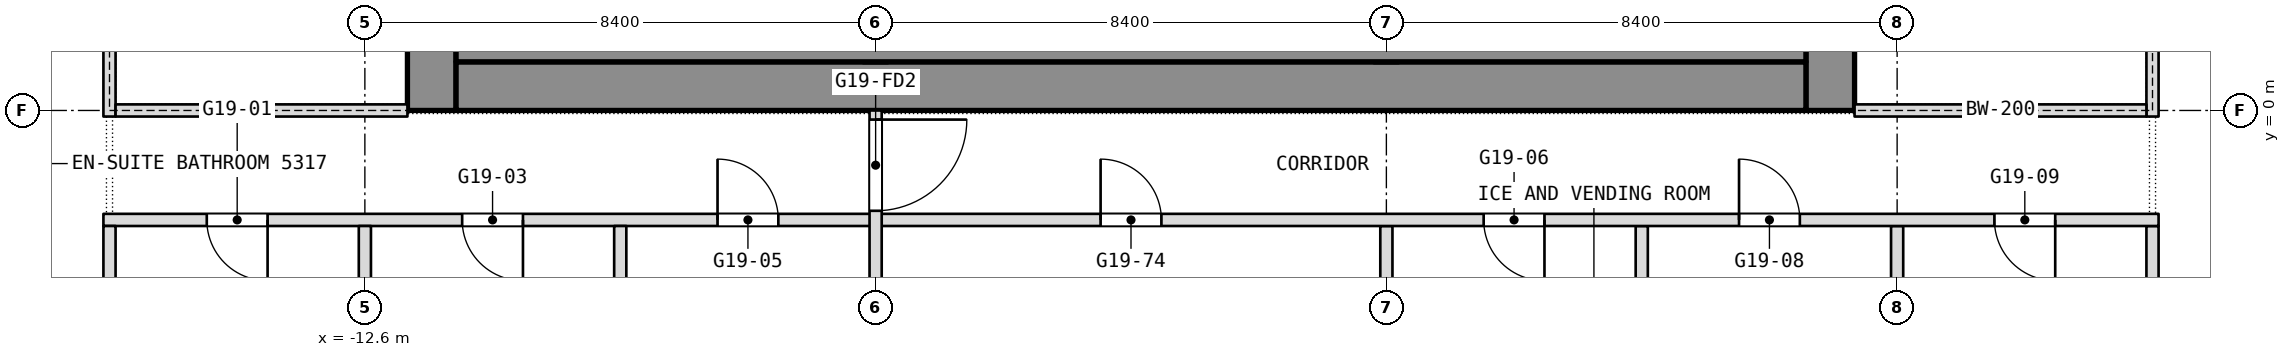
"""IFC4 building model, lengths in metres.
Left out: names, types, materials, properties, quantities, classifications, styles, units other than length and angle.
Written with IfcOpenShell. Run it as: python <this file> out.ifc"""

import sys

from ifc_helpers import new_model, si_unit, direction, frame, frame_2d, origin, place, context, subcontext, project, spatial, rectangle, extrude, element, fill, save


model = new_model("IFC4")
c1 = context("Model", 3, precision=1e-05, world=origin(), true_north=direction((0.0, 1.0)))
c2 = subcontext(c1, "Body", "Model", "MODEL_VIEW")
j1 = project(units=[si_unit("LENGTHUNIT", "METRE"), si_unit("PLANEANGLEUNIT", "RADIAN")], contexts=[c1])
p1 = place(None, origin())
s1 = spatial("IfcSite", under=j1, at=p1, CompositionType="ELEMENT")
p2 = place(p1, origin())
s2 = spatial("IfcBuilding", under=s1, at=p2, CompositionType="ELEMENT")
p3 = place(p2, frame((0.0, 0.0, 227.3)))
s3 = spatial("IfcBuildingStorey", under=s2, at=p3, CompositionType="ELEMENT", Elevation=227.3)
p4 = place(p3, frame((11.5, 0.0, 0.0), z_axis=(0.0, 0.0, 1.0), x_axis=(0.0, 1.0, 0.0)))
e1 = element("IfcWall", 1, at=p4, inside=s3, PredefinedType="SHEAR", context=c2, shape_type="SweptSolid", body=[
    extrude(rectangle(XDim=16.8, YDim=0.8, at=frame_2d((8.4, 0.0))), origin(), (0.0, 0.0, 1.0), 3.6),
])
p5 = place(p4, frame((2.3, 0.0, 0.0)))
e2 = element("IfcOpeningElement", 2, at=p5, cuts=e1, PredefinedType="OPENING", context=c2, shape_type="SweptSolid", body=[
    extrude(rectangle(XDim=1.1, YDim=2.1, at=frame_2d((0.55, 1.05))), frame((0.0, 0.4, 0.0), z_axis=(0.0, -1.0, 0.0), x_axis=(1.0, 0.0, 0.0)), (0.0, 0.0, 1.0), 0.8),
])
p6 = place(p4, frame((4.85, 0.0, 0.0)))
e3 = element("IfcOpeningElement", 3, at=p6, cuts=e1, PredefinedType="OPENING", context=c2, shape_type="SweptSolid", body=[
    extrude(rectangle(XDim=1.1, YDim=2.1, at=frame_2d((0.55, 1.05))), frame((0.0, 0.4, 0.0), z_axis=(0.0, -1.0, 0.0), x_axis=(1.0, 0.0, 0.0)), (0.0, 0.0, 1.0), 0.8),
])
p7 = place(p4, frame((6.825, 0.0, 0.0)))
e4 = element("IfcOpeningElement", 4, at=p7, cuts=e1, PredefinedType="OPENING", context=c2, shape_type="SweptSolid", body=[
    extrude(rectangle(XDim=1.2, YDim=2.1, at=frame_2d((0.6, 1.05))), frame((0.0, 0.4, 0.0), z_axis=(0.0, -1.0, 0.0), x_axis=(1.0, 0.0, 0.0)), (0.0, 0.0, 1.0), 0.8),
])
p8 = place(p4, frame((13.4, 0.0, 0.0)))
e5 = element("IfcOpeningElement", 5, at=p8, cuts=e1, PredefinedType="OPENING", context=c2, shape_type="SweptSolid", body=[
    extrude(rectangle(XDim=1.1, YDim=2.1, at=frame_2d((0.55, 1.05))), frame((0.0, 0.4, 0.0), z_axis=(0.0, -1.0, 0.0), x_axis=(1.0, 0.0, 0.0)), (0.0, 0.0, 1.0), 0.8),
])
p9 = place(p4, frame((10.85, 0.0, 0.0)))
e6 = element("IfcOpeningElement", 6, at=p9, cuts=e1, PredefinedType="OPENING", context=c2, shape_type="SweptSolid", body=[
    extrude(rectangle(XDim=1.1, YDim=2.1, at=frame_2d((0.55, 1.05))), frame((0.0, 0.4, 0.0), z_axis=(0.0, -1.0, 0.0), x_axis=(1.0, 0.0, 0.0)), (0.0, 0.0, 1.0), 0.8),
])
p10 = place(p4, frame((8.775, 0.0, 0.0)))
e7 = element("IfcOpeningElement", 7, at=p10, cuts=e1, PredefinedType="OPENING", context=c2, shape_type="SweptSolid", body=[
    extrude(rectangle(XDim=1.2, YDim=2.1, at=frame_2d((0.6, 1.05))), frame((0.0, 0.4, 0.0), z_axis=(0.0, -1.0, 0.0), x_axis=(1.0, 0.0, 0.0)), (0.0, 0.0, 1.0), 0.8),
])
p11 = place(p3, frame((-11.5, 0.0, 0.0), z_axis=(0.0, 0.0, 1.0), x_axis=(0.0, 1.0, 0.0)))
e8 = element("IfcWall", 8, at=p11, inside=s3, PredefinedType="SHEAR", context=c2, shape_type="SweptSolid", body=[
    extrude(rectangle(XDim=16.8, YDim=0.8, at=frame_2d((8.4, 0.0))), origin(), (0.0, 0.0, 1.0), 3.6),
])
p12 = place(p11, frame((1.688, 0.0, 0.0)))
e9 = element("IfcOpeningElement", 9, at=p12, cuts=e8, PredefinedType="OPENING", context=c2, shape_type="SweptSolid", body=[
    extrude(rectangle(XDim=0.9, YDim=2.1, at=frame_2d((0.45, 1.05))), frame((0.0, 0.4, 0.0), z_axis=(0.0, -1.0, 0.0), x_axis=(1.0, 0.0, 0.0)), (0.0, 0.0, 1.0), 0.8),
])
p13 = place(p11, frame((4.312, 0.0, 0.0)))
e10 = element("IfcOpeningElement", 10, at=p13, cuts=e8, PredefinedType="OPENING", context=c2, shape_type="SweptSolid", body=[
    extrude(rectangle(XDim=0.9, YDim=2.1, at=frame_2d((0.45, 1.05))), frame((0.0, 0.4, 0.0), z_axis=(0.0, -1.0, 0.0), x_axis=(1.0, 0.0, 0.0)), (0.0, 0.0, 1.0), 0.8),
])
p14 = place(p11, frame((6.825, 0.0, 0.0)))
e11 = element("IfcOpeningElement", 11, at=p14, cuts=e8, PredefinedType="OPENING", context=c2, shape_type="SweptSolid", body=[
    extrude(rectangle(XDim=1.2, YDim=2.1, at=frame_2d((0.6, 1.05))), frame((0.0, 0.4, 0.0), z_axis=(0.0, -1.0, 0.0), x_axis=(1.0, 0.0, 0.0)), (0.0, 0.0, 1.0), 0.8),
])
p15 = place(p11, frame((12.3, 0.0, 0.0)))
e12 = element("IfcOpeningElement", 12, at=p15, cuts=e8, PredefinedType="OPENING", context=c2, shape_type="SweptSolid", body=[
    extrude(rectangle(XDim=0.9, YDim=2.1, at=frame_2d((0.45, 1.05))), frame((0.0, 0.4, 0.0), z_axis=(0.0, -1.0, 0.0), x_axis=(1.0, 0.0, 0.0)), (0.0, 0.0, 1.0), 0.8),
])
p16 = place(p11, frame((8.775, 0.0, 0.0)))
e13 = element("IfcOpeningElement", 13, at=p16, cuts=e8, PredefinedType="OPENING", context=c2, shape_type="SweptSolid", body=[
    extrude(rectangle(XDim=1.2, YDim=2.1, at=frame_2d((0.6, 1.05))), frame((0.0, 0.4, 0.0), z_axis=(0.0, -1.0, 0.0), x_axis=(1.0, 0.0, 0.0)), (0.0, 0.0, 1.0), 0.8),
])
p17 = place(p3, frame((-11.1, 0.4, 0.0), z_axis=(0.0, 0.0, 1.0), x_axis=(1.0, 0.0, 0.0)))
e14 = element("IfcWall", 14, at=p17, inside=s3, PredefinedType="SHEAR", context=c2, shape_type="SweptSolid", body=[
    extrude(rectangle(XDim=22.2, YDim=0.8, at=frame_2d((11.1, 0.0))), origin(), (0.0, 0.0, 1.0), 3.6),
])
p18 = place(p3, frame((-4.2, 0.8, 0.0), z_axis=(0.0, 0.0, 1.0), x_axis=(0.0, 1.0, 0.0)))
e15 = element("IfcWall", 15, at=p18, inside=s3, PredefinedType="SHEAR", context=c2, shape_type="SweptSolid", body=[
    extrude(rectangle(XDim=15.2, YDim=0.4, at=frame_2d((7.6, 0.0))), origin(), (0.0, 0.0, 1.0), 3.6),
])
p19 = place(p18, frame((8.5, 0.0, 0.0)))
e16 = element("IfcOpeningElement", 16, at=p19, cuts=e15, PredefinedType="OPENING", context=c2, shape_type="SweptSolid", body=[
    extrude(rectangle(XDim=1.2, YDim=2.1, at=frame_2d((0.6, 1.05))), frame((0.0, 0.2, 0.0), z_axis=(0.0, -1.0, 0.0), x_axis=(1.0, 0.0, 0.0)), (0.0, 0.0, 1.0), 0.4),
])
p20 = place(p3, frame((4.2, 0.8, 0.0), z_axis=(0.0, 0.0, 1.0), x_axis=(0.0, 1.0, 0.0)))
e17 = element("IfcWall", 17, at=p20, inside=s3, PredefinedType="SHEAR", context=c2, shape_type="SweptSolid", body=[
    extrude(rectangle(XDim=15.2, YDim=0.4, at=frame_2d((7.6, 0.0))), origin(), (0.0, 0.0, 1.0), 3.6),
])
p21 = place(p20, frame((5.95, 0.0, 0.0)))
e18 = element("IfcOpeningElement", 18, at=p21, cuts=e17, PredefinedType="OPENING", context=c2, shape_type="SweptSolid", body=[
    extrude(rectangle(XDim=1.2, YDim=2.1, at=frame_2d((0.6, 1.05))), frame((0.0, 0.2, 0.0), z_axis=(0.0, -1.0, 0.0), x_axis=(1.0, 0.0, 0.0)), (0.0, 0.0, 1.0), 0.4),
])
for number, where, z_axis, x_axis in (
    (19, (16.8, -7.8, 0.0), (0.0, 0.0, 1.0), (0.0, 1.0, 0.0)),
    (20, (12.6, -7.8, 0.0), (0.0, 0.0, 1.0), (0.0, 1.0, 0.0)),
):
    element("IfcWall", number, at=place(p3, frame(where, z_axis=z_axis, x_axis=x_axis)), inside=s3, PredefinedType="PARTITIONING", context=c2, shape_type="SweptSolid", body=[
        extrude(rectangle(XDim=5.9, YDim=0.2, at=frame_2d((2.95, 0.0))), origin(), (0.0, 0.0, 1.0), 3.34),
    ])
p22 = place(p3, frame((8.4, -8.0, 0.0), z_axis=(0.0, 0.0, 1.0), x_axis=(0.0, 1.0, 0.0)))
e21 = element("IfcWall", 21, at=p22, inside=s3, PredefinedType="PARTITIONING", context=c2, shape_type="SweptSolid", body=[
    extrude(rectangle(XDim=6.1, YDim=0.2, at=frame_2d((3.05, 0.0))), origin(), (0.0, 0.0, 1.0), 3.34),
])
p23 = place(p3, frame((4.2, -11.6, 0.0), z_axis=(0.0, 0.0, 1.0), x_axis=(0.0, 1.0, 0.0)))
e22 = element("IfcWall", 22, at=p23, inside=s3, PredefinedType="PARTITIONING", context=c2, shape_type="SweptSolid", body=[
    extrude(rectangle(XDim=9.7, YDim=0.2, at=frame_2d((4.85, 0.0))), origin(), (0.0, 0.0, 1.0), 3.34),
])
p24 = place(p3, frame((-16.9, -1.8, 0.0), z_axis=(0.0, 0.0, 1.0), x_axis=(1.0, 0.0, 0.0)))
e23 = element("IfcWall", 23, at=p24, inside=s3, PredefinedType="PARTITIONING", context=c2, shape_type="SweptSolid", body=[
    extrude(rectangle(XDim=33.8, YDim=0.2, at=frame_2d((16.9, 0.0))), origin(), (0.0, 0.0, 1.0), 3.34),
])
p25 = place(p24, frame((1.7, 0.0, 0.0)))
e24 = element("IfcOpeningElement", 24, at=p25, cuts=e23, PredefinedType="OPENING", context=c2, shape_type="SweptSolid", body=[
    extrude(rectangle(XDim=1.0, YDim=2.1, at=frame_2d((0.5, 1.05))), frame((0.0, 0.1, 0.0), z_axis=(0.0, -1.0, 0.0), x_axis=(1.0, 0.0, 0.0)), (0.0, 0.0, 1.0), 0.2),
])
p26 = place(p24, frame((5.9, 0.0, 0.0)))
e25 = element("IfcOpeningElement", 25, at=p26, cuts=e23, PredefinedType="OPENING", context=c2, shape_type="SweptSolid", body=[
    extrude(rectangle(XDim=1.0, YDim=2.1, at=frame_2d((0.5, 1.05))), frame((0.0, 0.1, 0.0), z_axis=(0.0, -1.0, 0.0), x_axis=(1.0, 0.0, 0.0)), (0.0, 0.0, 1.0), 0.2),
])
p27 = place(p24, frame((10.1, 0.0, 0.0)))
e26 = element("IfcOpeningElement", 26, at=p27, cuts=e23, PredefinedType="OPENING", context=c2, shape_type="SweptSolid", body=[
    extrude(rectangle(XDim=1.0, YDim=2.1, at=frame_2d((0.5, 1.05))), frame((0.0, 0.1, 0.0), z_axis=(0.0, -1.0, 0.0), x_axis=(1.0, 0.0, 0.0)), (0.0, 0.0, 1.0), 0.2),
])
p28 = place(p24, frame((22.7, 0.0, 0.0)))
e27 = element("IfcOpeningElement", 27, at=p28, cuts=e23, PredefinedType="OPENING", context=c2, shape_type="SweptSolid", body=[
    extrude(rectangle(XDim=1.0, YDim=2.1, at=frame_2d((0.5, 1.05))), frame((0.0, 0.1, 0.0), z_axis=(0.0, -1.0, 0.0), x_axis=(1.0, 0.0, 0.0)), (0.0, 0.0, 1.0), 0.2),
])
p29 = place(p24, frame((26.9, 0.0, 0.0)))
e28 = element("IfcOpeningElement", 28, at=p29, cuts=e23, PredefinedType="OPENING", context=c2, shape_type="SweptSolid", body=[
    extrude(rectangle(XDim=1.0, YDim=2.1, at=frame_2d((0.5, 1.05))), frame((0.0, 0.1, 0.0), z_axis=(0.0, -1.0, 0.0), x_axis=(1.0, 0.0, 0.0)), (0.0, 0.0, 1.0), 0.2),
])
p30 = place(p24, frame((31.1, 0.0, 0.0)))
e29 = element("IfcOpeningElement", 29, at=p30, cuts=e23, PredefinedType="OPENING", context=c2, shape_type="SweptSolid", body=[
    extrude(rectangle(XDim=1.0, YDim=2.1, at=frame_2d((0.5, 1.05))), frame((0.0, 0.1, 0.0), z_axis=(0.0, -1.0, 0.0), x_axis=(1.0, 0.0, 0.0)), (0.0, 0.0, 1.0), 0.2),
])
p31 = place(p24, frame((16.4, 0.0, 0.0)))
e30 = element("IfcOpeningElement", 30, at=p31, cuts=e23, PredefinedType="OPENING", context=c2, shape_type="SweptSolid", body=[
    extrude(rectangle(XDim=1.0, YDim=2.1, at=frame_2d((0.5, 1.05))), frame((0.0, 0.1, 0.0), z_axis=(0.0, -1.0, 0.0), x_axis=(1.0, 0.0, 0.0)), (0.0, 0.0, 1.0), 0.2),
])
p32 = place(p3, frame((-4.2, -13.6, 0.0), z_axis=(0.0, 0.0, 1.0), x_axis=(0.0, 1.0, 0.0)))
e31 = element("IfcWall", 31, at=p32, inside=s3, PredefinedType="PARTITIONING", context=c2, shape_type="SweptSolid", body=[
    extrude(rectangle(XDim=13.6, YDim=0.2, at=frame_2d((6.8, 0.0))), origin(), (0.0, 0.0, 1.0), 3.34),
])
p33 = place(p32, frame((11.95, 0.0, 0.0)))
e32 = element("IfcOpeningElement", 32, at=p33, cuts=e31, PredefinedType="OPENING", context=c2, shape_type="SweptSolid", body=[
    extrude(rectangle(XDim=1.5, YDim=2.1, at=frame_2d((0.75, 1.05))), frame((0.0, 0.1, 0.0), z_axis=(0.0, -1.0, 0.0), x_axis=(1.0, 0.0, 0.0)), (0.0, 0.0, 1.0), 0.2),
])
p34 = place(p32, frame((0.25, 0.0, 0.0)))
e33 = element("IfcOpeningElement", 33, at=p34, cuts=e31, PredefinedType="OPENING", context=c2, shape_type="SweptSolid", body=[
    extrude(rectangle(XDim=1.5, YDim=2.1, at=frame_2d((0.75, 1.05))), frame((0.0, 0.1, 0.0), z_axis=(0.0, -1.0, 0.0), x_axis=(1.0, 0.0, 0.0)), (0.0, 0.0, 1.0), 0.2),
])
p35 = place(p3, frame((-8.4, -8.0, 0.0), z_axis=(0.0, 0.0, 1.0), x_axis=(0.0, 1.0, 0.0)))
e34 = element("IfcWall", 34, at=p35, inside=s3, PredefinedType="PARTITIONING", context=c2, shape_type="SweptSolid", body=[
    extrude(rectangle(XDim=6.1, YDim=0.2, at=frame_2d((3.05, 0.0))), origin(), (0.0, 0.0, 1.0), 3.34),
])
p36 = place(p3, frame((-12.6, -7.8, 0.0), z_axis=(0.0, 0.0, 1.0), x_axis=(0.0, 1.0, 0.0)))
e35 = element("IfcWall", 35, at=p36, inside=s3, PredefinedType="PARTITIONING", context=c2, shape_type="SweptSolid", body=[
    extrude(rectangle(XDim=5.9, YDim=0.2, at=frame_2d((2.95, 0.0))), origin(), (0.0, 0.0, 1.0), 3.34),
])
p37 = place(p3, frame((-16.8, -8.0, 0.0), z_axis=(0.0, 0.0, 1.0), x_axis=(0.0, 1.0, 0.0)))
e36 = element("IfcWall", 36, at=p37, inside=s3, PredefinedType="PARTITIONING", context=c2, shape_type="SweptSolid", body=[
    extrude(rectangle(XDim=6.1, YDim=0.2, at=frame_2d((3.05, 0.0))), origin(), (0.0, 0.0, 1.0), 3.34),
])
p38 = place(p3, frame((-11.1, 1.15, 0.0), z_axis=(0.0, 0.0, 1.0), x_axis=(1.0, 0.0, 0.0)))
e37 = element("IfcWall", 37, at=p38, inside=s3, PredefinedType="PARTITIONING", context=c2, shape_type="SweptSolid", body=[
    extrude(rectangle(XDim=22.2, YDim=0.7, at=frame_2d((11.1, 0.0))), origin(), (0.0, 0.0, 1.0), 3.34),
])
p39 = place(p3, frame((-16.8, -0.1, 0.0), z_axis=(0.0, 0.0, 1.0), x_axis=(0.0, 1.0, 0.0)))
e38 = element("IfcWall", 38, at=p39, inside=s3, PredefinedType="PARTITIONING", context=c2, shape_type="SweptSolid", body=[
    extrude(rectangle(XDim=17.0, YDim=0.2, at=frame_2d((8.5, 0.0))), origin(), (0.0, 0.0, 1.0), 3.34),
])
p40 = place(p39, frame((2.2, 0.0, 0.0)))
e39 = element("IfcOpeningElement", 39, at=p40, cuts=e38, PredefinedType="OPENING", context=c2, shape_type="SweptSolid", body=[
    extrude(rectangle(XDim=1.8, YDim=2.1, at=frame_2d((0.9, 1.05))), frame((0.0, 0.1, 0.0), z_axis=(0.0, -1.0, 0.0), x_axis=(1.0, 0.0, 0.0)), (0.0, 0.0, 1.0), 0.2),
])
p41 = place(p39, frame((13.0, 0.0, 0.0)))
e40 = element("IfcOpeningElement", 40, at=p41, cuts=e38, PredefinedType="OPENING", context=c2, shape_type="SweptSolid", body=[
    extrude(rectangle(XDim=1.8, YDim=2.1, at=frame_2d((0.9, 1.05))), frame((0.0, 0.1, 0.0), z_axis=(0.0, -1.0, 0.0), x_axis=(1.0, 0.0, 0.0)), (0.0, 0.0, 1.0), 0.2),
])
p42 = place(p3, frame((-16.7, 0.0, 0.0), z_axis=(0.0, 0.0, 1.0), x_axis=(1.0, 0.0, 0.0)))
e41 = element("IfcWall", 41, at=p42, inside=s3, PredefinedType="PARTITIONING", context=c2, shape_type="SweptSolid", body=[
    extrude(rectangle(XDim=4.8, YDim=0.2, at=frame_2d((2.4, 0.0))), origin(), (0.0, 0.0, 1.0), 2.94),
])
p43 = place(p3, frame((16.8, -0.1, 0.0), z_axis=(0.0, 0.0, 1.0), x_axis=(0.0, 1.0, 0.0)))
e42 = element("IfcWall", 42, at=p43, inside=s3, PredefinedType="PARTITIONING", context=c2, shape_type="SweptSolid", body=[
    extrude(rectangle(XDim=17.0, YDim=0.2, at=frame_2d((8.5, 0.0))), origin(), (0.0, 0.0, 1.0), 3.34),
])
p44 = place(p43, frame((2.2, 0.0, 0.0)))
e43 = element("IfcOpeningElement", 43, at=p44, cuts=e42, PredefinedType="OPENING", context=c2, shape_type="SweptSolid", body=[
    extrude(rectangle(XDim=1.8, YDim=2.1, at=frame_2d((0.9, 1.05))), frame((0.0, 0.1, 0.0), z_axis=(0.0, -1.0, 0.0), x_axis=(1.0, 0.0, 0.0)), (0.0, 0.0, 1.0), 0.2),
])
p45 = place(p43, frame((13.0, 0.0, 0.0)))
e44 = element("IfcOpeningElement", 44, at=p45, cuts=e42, PredefinedType="OPENING", context=c2, shape_type="SweptSolid", body=[
    extrude(rectangle(XDim=1.8, YDim=2.1, at=frame_2d((0.9, 1.05))), frame((0.0, 0.1, 0.0), z_axis=(0.0, -1.0, 0.0), x_axis=(1.0, 0.0, 0.0)), (0.0, 0.0, 1.0), 0.2),
])
p46 = place(p3, frame((11.9, 0.0, 0.0), z_axis=(0.0, 0.0, 1.0), x_axis=(1.0, 0.0, 0.0)))
e45 = element("IfcWall", 45, at=p46, inside=s3, PredefinedType="PARTITIONING", context=c2, shape_type="SweptSolid", body=[
    extrude(rectangle(XDim=4.8, YDim=0.2, at=frame_2d((2.4, 0.0))), origin(), (0.0, 0.0, 1.0), 2.94),
])
p47 = place(p25, origin())
e46 = element("IfcDoor", 46, at=p47, inside=s3, OperationType="SINGLE_SWING_LEFT", PredefinedType="DOOR", context=c2, shape_type="SweptSolid", body=[
    extrude(rectangle(XDim=1.0, YDim=2.1, at=frame_2d((0.5, 1.05))), frame((0.0, 0.025, 0.0), z_axis=(0.0, -1.0, 0.0), x_axis=(1.0, 0.0, 0.0)), (0.0, 0.0, 1.0), 0.05),
])
fill(e24, e46)
p48 = place(p26, origin())
e47 = element("IfcDoor", 47, at=p48, inside=s3, OperationType="SINGLE_SWING_LEFT", PredefinedType="DOOR", context=c2, shape_type="SweptSolid", body=[
    extrude(rectangle(XDim=1.0, YDim=2.1, at=frame_2d((0.5, 1.05))), frame((0.0, 0.025, 0.0), z_axis=(0.0, -1.0, 0.0), x_axis=(1.0, 0.0, 0.0)), (0.0, 0.0, 1.0), 0.05),
])
fill(e25, e47)
p49 = place(p27, origin())
e48 = element("IfcDoor", 48, at=p49, inside=s3, OperationType="SINGLE_SWING_RIGHT", PredefinedType="DOOR", context=c2, shape_type="SweptSolid", body=[
    extrude(rectangle(XDim=1.0, YDim=2.1, at=frame_2d((0.5, 1.05))), frame((0.0, 0.025, 0.0), z_axis=(0.0, -1.0, 0.0), x_axis=(1.0, 0.0, 0.0)), (0.0, 0.0, 1.0), 0.05),
])
fill(e26, e48)
p50 = place(p28, origin())
e49 = element("IfcDoor", 49, at=p50, inside=s3, OperationType="SINGLE_SWING_RIGHT", PredefinedType="DOOR", context=c2, shape_type="SweptSolid", body=[
    extrude(rectangle(XDim=1.0, YDim=2.1, at=frame_2d((0.5, 1.05))), frame((0.0, 0.025, 0.0), z_axis=(0.0, -1.0, 0.0), x_axis=(1.0, 0.0, 0.0)), (0.0, 0.0, 1.0), 0.05),
])
fill(e27, e49)
p51 = place(p29, origin())
e50 = element("IfcDoor", 50, at=p51, inside=s3, OperationType="SINGLE_SWING_LEFT", PredefinedType="DOOR", context=c2, shape_type="SweptSolid", body=[
    extrude(rectangle(XDim=1.0, YDim=2.1, at=frame_2d((0.5, 1.05))), frame((0.0, 0.025, 0.0), z_axis=(0.0, -1.0, 0.0), x_axis=(1.0, 0.0, 0.0)), (0.0, 0.0, 1.0), 0.05),
])
fill(e28, e50)
p52 = place(p30, origin())
e51 = element("IfcDoor", 51, at=p52, inside=s3, OperationType="SINGLE_SWING_LEFT", PredefinedType="DOOR", context=c2, shape_type="SweptSolid", body=[
    extrude(rectangle(XDim=1.0, YDim=2.1, at=frame_2d((0.5, 1.05))), frame((0.0, 0.025, 0.0), z_axis=(0.0, -1.0, 0.0), x_axis=(1.0, 0.0, 0.0)), (0.0, 0.0, 1.0), 0.05),
])
fill(e29, e51)
p53 = place(p31, origin())
e52 = element("IfcDoor", 52, at=p53, inside=s3, OperationType="SINGLE_SWING_LEFT", PredefinedType="DOOR", context=c2, shape_type="SweptSolid", body=[
    extrude(rectangle(XDim=1.0, YDim=2.1, at=frame_2d((0.5, 1.05))), frame((0.0, 0.025, 0.0), z_axis=(0.0, -1.0, 0.0), x_axis=(1.0, 0.0, 0.0)), (0.0, 0.0, 1.0), 0.05),
])
fill(e30, e52)
p54 = place(p33, origin())
e53 = element("IfcDoor", 53, at=p54, inside=s3, OperationType="DOUBLE_DOOR_DOUBLE_SWING", PredefinedType="DOOR", context=c2, shape_type="SweptSolid", body=[
    extrude(rectangle(XDim=1.5, YDim=2.1, at=frame_2d((0.75, 1.05))), frame((0.0, 0.025, 0.0), z_axis=(0.0, -1.0, 0.0), x_axis=(1.0, 0.0, 0.0)), (0.0, 0.0, 1.0), 0.05),
])
fill(e32, e53)
save(model, sys.argv[1])
